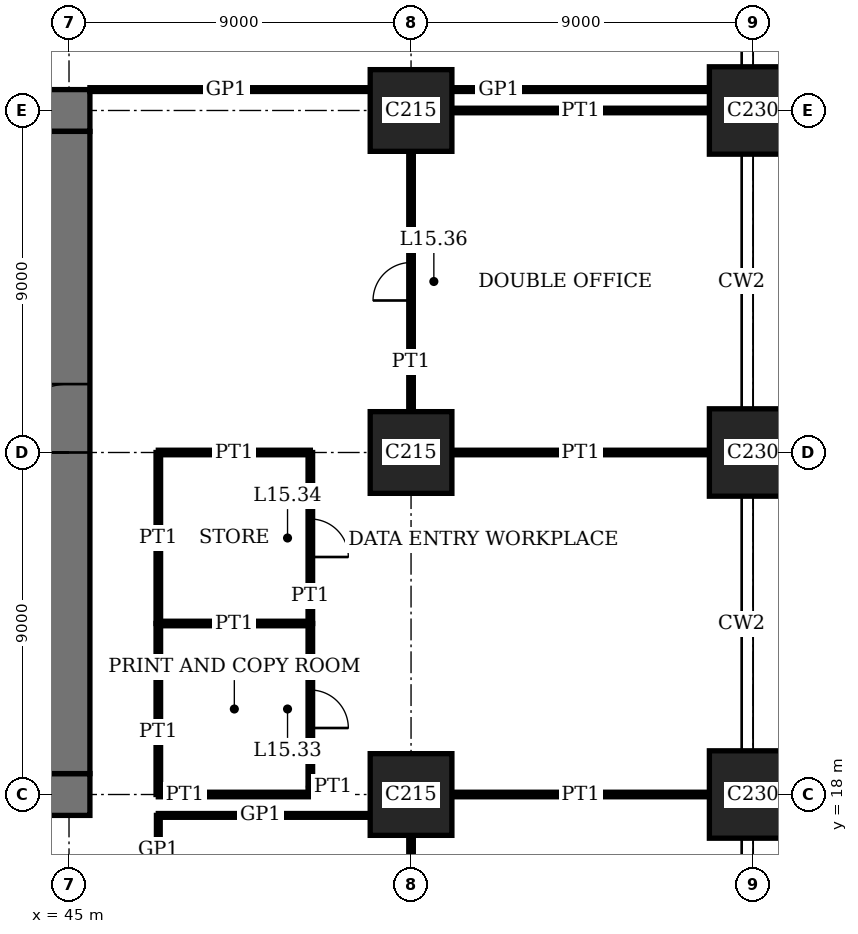
"""IFC4 building model, lengths in metres.
Left out: names, types, materials, properties, quantities, classifications, styles, units other than length and angle.
Written with IfcOpenShell. Run it as: python <this file> out.ifc"""

import sys

from ifc_helpers import new_model, si_unit, direction, frame, frame_2d, origin, origin_2d, place, context, subcontext, project, spatial, rectangle, extrude, element, fill, save


model = new_model("IFC4")
c1 = context("Model", 3, precision=1e-05, world=origin(), true_north=direction((0.0, 1.0)))
c2 = subcontext(c1, "Body", "Model", "MODEL_VIEW")
j1 = project(units=[si_unit("LENGTHUNIT", "METRE"), si_unit("PLANEANGLEUNIT", "RADIAN")], contexts=[c1])
p1 = place(None, origin())
s1 = spatial("IfcSite", under=j1, at=p1, CompositionType="ELEMENT")
p2 = place(p1, origin())
s2 = spatial("IfcBuilding", under=s1, at=p2, CompositionType="ELEMENT")
p3 = place(p2, frame((0.0, 0.0, 63.8)))
s3 = spatial("IfcBuildingStorey", under=s2, at=p3, CompositionType="ELEMENT", Elevation=63.8)
for number, where, z_axis, x_axis in (
    (1, (54.0, 18.0, 0.0), (0.0, 0.0, 1.0), (1.0, 0.0, 0.0)),
    (2, (54.0, 27.0, 0.0), (0.0, 0.0, 1.0), (1.0, 0.0, 0.0)),
    (3, (54.0, 36.0, 0.0), (0.0, 0.0, 1.0), (1.0, 0.0, 0.0)),
):
    element("IfcColumn", number, at=place(p3, frame(where, z_axis=z_axis, x_axis=x_axis)), inside=s3, PredefinedType="COLUMN", context=c2, shape_type="SweptSolid", body=[
        extrude(rectangle(XDim=2.15, YDim=2.15, at=origin_2d()), origin(), (0.0, 0.0, 1.0), 4.0),
    ])
for number, where, z_axis, x_axis in (
    (4, (63.0, 18.0, 0.0), (0.0, 0.0, 1.0), (1.0, 0.0, 0.0)),
    (5, (63.0, 27.0, 0.0), (0.0, 0.0, 1.0), (1.0, 0.0, 0.0)),
    (6, (63.0, 36.0, 0.0), (0.0, 0.0, 1.0), (1.0, 0.0, 0.0)),
):
    element("IfcColumn", number, at=place(p3, frame(where, z_axis=z_axis, x_axis=x_axis)), inside=s3, PredefinedType="COLUMN", context=c2, shape_type="SweptSolid", body=[
        extrude(rectangle(XDim=2.3, YDim=2.3, at=origin_2d()), origin(), (0.0, 0.0, 1.0), 4.0),
    ])
p4 = place(p3, frame((17.45, 18.0, 0.0), z_axis=(0.0, 0.0, 1.0), x_axis=(1.0, 0.0, 0.0)))
e7 = element("IfcWall", 7, at=p4, inside=s3, PredefinedType="SHEAR", context=c2, shape_type="SweptSolid", body=[
    extrude(rectangle(XDim=28.1, YDim=1.1, at=frame_2d((14.05, 0.0))), origin(), (0.0, 0.0, 1.0), 4.0),
])
p5 = place(p4, frame((11.55, 0.0, 0.0)))
e8 = element("IfcOpeningElement", 8, at=p5, cuts=e7, PredefinedType="OPENING", context=c2, shape_type="SweptSolid", body=[
    extrude(rectangle(XDim=1.0, YDim=2.4, at=frame_2d((0.5, 1.2))), frame((0.0, 0.56, 0.0), z_axis=(0.0, -1.0, 0.0), x_axis=(1.0, 0.0, 0.0)), (0.0, 0.0, 1.0), 1.12),
])
p6 = place(p4, frame((16.55, 0.0, 0.0)))
e9 = element("IfcOpeningElement", 9, at=p6, cuts=e7, PredefinedType="OPENING", context=c2, shape_type="SweptSolid", body=[
    extrude(rectangle(XDim=1.0, YDim=2.4, at=frame_2d((0.5, 1.2))), frame((0.0, 0.56, 0.0), z_axis=(0.0, -1.0, 0.0), x_axis=(1.0, 0.0, 0.0)), (0.0, 0.0, 1.0), 1.12),
])
p7 = place(p4, frame((20.0, 0.0, 0.0)))
e10 = element("IfcOpeningElement", 10, at=p7, cuts=e7, PredefinedType="OPENING", context=c2, shape_type="SweptSolid", body=[
    extrude(rectangle(XDim=1.1, YDim=2.4, at=frame_2d((0.55, 1.2))), frame((0.0, 0.56, 0.0), z_axis=(0.0, -1.0, 0.0), x_axis=(1.0, 0.0, 0.0)), (0.0, 0.0, 1.0), 1.12),
])
p8 = place(p4, frame((24.05, 0.0, 0.0)))
e11 = element("IfcOpeningElement", 11, at=p8, cuts=e7, PredefinedType="OPENING", context=c2, shape_type="SweptSolid", body=[
    extrude(rectangle(XDim=1.0, YDim=2.4, at=frame_2d((0.5, 1.2))), frame((0.0, 0.56, 0.0), z_axis=(0.0, -1.0, 0.0), x_axis=(1.0, 0.0, 0.0)), (0.0, 0.0, 1.0), 1.12),
])
p9 = place(p3, frame((45.55, 36.0, 0.0), z_axis=(0.0, 0.0, 1.0), x_axis=(-1.0, 0.0, 0.0)))
e12 = element("IfcWall", 12, at=p9, inside=s3, PredefinedType="SHEAR", context=c2, shape_type="SweptSolid", body=[
    extrude(rectangle(XDim=28.1, YDim=1.1, at=frame_2d((14.05, 0.0))), origin(), (0.0, 0.0, 1.0), 4.0),
])
p10 = place(p9, frame((11.55, 0.0, 0.0)))
e13 = element("IfcOpeningElement", 13, at=p10, cuts=e12, PredefinedType="OPENING", context=c2, shape_type="SweptSolid", body=[
    extrude(rectangle(XDim=1.0, YDim=2.4, at=frame_2d((0.5, 1.2))), frame((0.0, 0.56, 0.0), z_axis=(0.0, -1.0, 0.0), x_axis=(1.0, 0.0, 0.0)), (0.0, 0.0, 1.0), 1.12),
])
p11 = place(p9, frame((16.55, 0.0, 0.0)))
e14 = element("IfcOpeningElement", 14, at=p11, cuts=e12, PredefinedType="OPENING", context=c2, shape_type="SweptSolid", body=[
    extrude(rectangle(XDim=1.0, YDim=2.4, at=frame_2d((0.5, 1.2))), frame((0.0, 0.56, 0.0), z_axis=(0.0, -1.0, 0.0), x_axis=(1.0, 0.0, 0.0)), (0.0, 0.0, 1.0), 1.12),
])
p12 = place(p9, frame((20.0, 0.0, 0.0)))
e15 = element("IfcOpeningElement", 15, at=p12, cuts=e12, PredefinedType="OPENING", context=c2, shape_type="SweptSolid", body=[
    extrude(rectangle(XDim=1.1, YDim=2.4, at=frame_2d((0.55, 1.2))), frame((0.0, 0.56, 0.0), z_axis=(0.0, -1.0, 0.0), x_axis=(1.0, 0.0, 0.0)), (0.0, 0.0, 1.0), 1.12),
])
p13 = place(p9, frame((24.05, 0.0, 0.0)))
e16 = element("IfcOpeningElement", 16, at=p13, cuts=e12, PredefinedType="OPENING", context=c2, shape_type="SweptSolid", body=[
    extrude(rectangle(XDim=1.0, YDim=2.4, at=frame_2d((0.5, 1.2))), frame((0.0, 0.56, 0.0), z_axis=(0.0, -1.0, 0.0), x_axis=(1.0, 0.0, 0.0)), (0.0, 0.0, 1.0), 1.12),
])
p14 = place(p3, frame((45.0, 18.55, 0.0), z_axis=(0.0, 0.0, 1.0), x_axis=(0.0, 1.0, 0.0)))
e17 = element("IfcWall", 17, at=p14, inside=s3, PredefinedType="SHEAR", context=c2, shape_type="SweptSolid", body=[
    extrude(rectangle(XDim=16.9, YDim=1.1, at=frame_2d((8.45, 0.0))), origin(), (0.0, 0.0, 1.0), 4.0),
])
p15 = place(p14, frame((8.45, 0.0, 0.0)))
e18 = element("IfcOpeningElement", 18, at=p15, cuts=e17, PredefinedType="OPENING", context=c2, shape_type="SweptSolid", body=[
    extrude(rectangle(XDim=1.8, YDim=2.4, at=frame_2d((0.9, 1.2))), frame((0.0, 0.56, 0.0), z_axis=(0.0, -1.0, 0.0), x_axis=(1.0, 0.0, 0.0)), (0.0, 0.0, 1.0), 1.12),
])
p16 = place(p3, frame((47.35, 17.45, 0.0), z_axis=(0.0, 0.0, 1.0), x_axis=(1.0, 0.0, 0.0)))
e19 = element("IfcWall", 19, at=p16, inside=s3, PredefinedType="PARTITIONING", context=c2, shape_type="SweptSolid", body=[
    extrude(rectangle(XDim=5.575, YDim=0.1, at=frame_2d((2.788, 0.0))), origin(), (0.0, 0.0, 1.0), 3.05),
])
p17 = place(p3, frame((47.35, 18.0, 0.0), z_axis=(0.0, 0.0, 1.0), x_axis=(1.0, 0.0, 0.0)))
e20 = element("IfcWall", 20, at=p17, inside=s3, PredefinedType="PARTITIONING", context=c2, shape_type="SweptSolid", body=[
    extrude(rectangle(XDim=4.0, YDim=0.12, at=frame_2d((2.0, 0.0))), origin(), (0.0, 0.0, 1.0), 3.05),
])
p18 = place(p3, frame((55.075, 18.0, 0.0), z_axis=(0.0, 0.0, 1.0), x_axis=(1.0, 0.0, 0.0)))
e21 = element("IfcWall", 21, at=p18, inside=s3, PredefinedType="PARTITIONING", context=c2, shape_type="SweptSolid", body=[
    extrude(rectangle(XDim=6.775, YDim=0.12, at=frame_2d((3.388, 0.0))), origin(), (0.0, 0.0, 1.0), 3.05),
])
p19 = place(p3, frame((47.35, 22.5, 0.0), z_axis=(0.0, 0.0, 1.0), x_axis=(1.0, 0.0, 0.0)))
e22 = element("IfcWall", 22, at=p19, inside=s3, PredefinedType="PARTITIONING", context=c2, shape_type="SweptSolid", body=[
    extrude(rectangle(XDim=4.0, YDim=0.12, at=frame_2d((2.0, 0.0))), origin(), (0.0, 0.0, 1.0), 3.1),
])
p20 = place(p3, frame((47.35, 27.0, 0.0), z_axis=(0.0, 0.0, 1.0), x_axis=(1.0, 0.0, 0.0)))
e23 = element("IfcWall", 23, at=p20, inside=s3, PredefinedType="PARTITIONING", context=c2, shape_type="SweptSolid", body=[
    extrude(rectangle(XDim=4.0, YDim=0.12, at=frame_2d((2.0, 0.0))), origin(), (0.0, 0.0, 1.0), 3.05),
])
for number, where, z_axis, x_axis in (
    (24, (55.075, 27.0, 0.0), (0.0, 0.0, 1.0), (1.0, 0.0, 0.0)),
    (25, (55.075, 36.0, 0.0), (0.0, 0.0, 1.0), (1.0, 0.0, 0.0)),
):
    element("IfcWall", number, at=place(p3, frame(where, z_axis=z_axis, x_axis=x_axis)), inside=s3, PredefinedType="PARTITIONING", context=c2, shape_type="SweptSolid", body=[
        extrude(rectangle(XDim=6.775, YDim=0.12, at=frame_2d((3.388, 0.0))), origin(), (0.0, 0.0, 1.0), 3.05),
    ])
p21 = place(p3, frame((45.55, 36.55, 0.0), z_axis=(0.0, 0.0, 1.0), x_axis=(1.0, 0.0, 0.0)))
e26 = element("IfcWall", 26, at=p21, inside=s3, PredefinedType="PARTITIONING", context=c2, shape_type="SweptSolid", body=[
    extrude(rectangle(XDim=7.375, YDim=0.1, at=frame_2d((3.688, 0.0))), origin(), (0.0, 0.0, 1.0), 3.05),
])
p22 = place(p3, frame((55.075, 36.55, 0.0), z_axis=(0.0, 0.0, 1.0), x_axis=(1.0, 0.0, 0.0)))
e27 = element("IfcWall", 27, at=p22, inside=s3, PredefinedType="PARTITIONING", context=c2, shape_type="SweptSolid", body=[
    extrude(rectangle(XDim=6.775, YDim=0.1, at=frame_2d((3.388, 0.0))), origin(), (0.0, 0.0, 1.0), 3.05),
])
for number, where, z_axis, x_axis in (
    (28, (47.35, 18.0, 0.0), (0.0, 0.0, 1.0), (0.0, 1.0, 0.0)),
    (29, (47.35, 22.5, 0.0), (0.0, 0.0, 1.0), (0.0, 1.0, 0.0)),
):
    element("IfcWall", number, at=place(p3, frame(where, z_axis=z_axis, x_axis=x_axis)), inside=s3, PredefinedType="PARTITIONING", context=c2, shape_type="SweptSolid", body=[
        extrude(rectangle(XDim=4.5, YDim=0.12, at=frame_2d((2.25, 0.0))), origin(), (0.0, 0.0, 1.0), 3.75),
    ])
p23 = place(p3, frame((47.35, 15.65, 0.0), z_axis=(0.0, 0.0, 1.0), x_axis=(0.0, 1.0, 0.0)))
e30 = element("IfcWall", 30, at=p23, inside=s3, PredefinedType="PARTITIONING", context=c2, shape_type="SweptSolid", body=[
    extrude(rectangle(XDim=1.8, YDim=0.1, at=frame_2d((0.9, 0.0))), origin(), (0.0, 0.0, 1.0), 3.75),
])
p24 = place(p3, frame((51.35, 18.0, 0.0), z_axis=(0.0, 0.0, 1.0), x_axis=(0.0, 1.0, 0.0)))
e31 = element("IfcWall", 31, at=p24, inside=s3, PredefinedType="PARTITIONING", context=c2, shape_type="SweptSolid", body=[
    extrude(rectangle(XDim=4.5, YDim=0.12, at=frame_2d((2.25, 0.0))), origin(), (0.0, 0.0, 1.0), 3.75),
])
p25 = place(p24, frame((1.75, 0.0, 0.0)))
e32 = element("IfcOpeningElement", 32, at=p25, cuts=e31, PredefinedType="OPENING", context=c2, shape_type="SweptSolid", body=[
    extrude(rectangle(XDim=1.0, YDim=2.4, at=frame_2d((0.5, 1.2))), frame((0.0, 0.07, 0.0), z_axis=(0.0, -1.0, 0.0), x_axis=(1.0, 0.0, 0.0)), (0.0, 0.0, 1.0), 0.14),
])
p26 = place(p3, frame((51.35, 22.5, 0.0), z_axis=(0.0, 0.0, 1.0), x_axis=(0.0, 1.0, 0.0)))
e33 = element("IfcWall", 33, at=p26, inside=s3, PredefinedType="PARTITIONING", context=c2, shape_type="SweptSolid", body=[
    extrude(rectangle(XDim=4.5, YDim=0.12, at=frame_2d((2.25, 0.0))), origin(), (0.0, 0.0, 1.0), 3.75),
])
p27 = place(p26, frame((1.75, 0.0, 0.0)))
e34 = element("IfcOpeningElement", 34, at=p27, cuts=e33, PredefinedType="OPENING", context=c2, shape_type="SweptSolid", body=[
    extrude(rectangle(XDim=1.0, YDim=2.4, at=frame_2d((0.5, 1.2))), frame((0.0, 0.07, 0.0), z_axis=(0.0, -1.0, 0.0), x_axis=(1.0, 0.0, 0.0)), (0.0, 0.0, 1.0), 0.14),
])
p28 = place(p3, frame((54.0, 10.075, 0.0), z_axis=(0.0, 0.0, 1.0), x_axis=(0.0, 1.0, 0.0)))
e35 = element("IfcWall", 35, at=p28, inside=s3, PredefinedType="PARTITIONING", context=c2, shape_type="SweptSolid", body=[
    extrude(rectangle(XDim=6.85, YDim=0.12, at=frame_2d((3.425, 0.0))), origin(), (0.0, 0.0, 1.0), 3.05),
])
p29 = place(p28, frame((2.925, 0.0, 0.0)))
e36 = element("IfcOpeningElement", 36, at=p29, cuts=e35, PredefinedType="OPENING", context=c2, shape_type="SweptSolid", body=[
    extrude(rectangle(XDim=1.0, YDim=2.4, at=frame_2d((0.5, 1.2))), frame((0.0, 0.07, 0.0), z_axis=(0.0, -1.0, 0.0), x_axis=(1.0, 0.0, 0.0)), (0.0, 0.0, 1.0), 0.14),
])
p30 = place(p3, frame((54.0, 28.075, 0.0), z_axis=(0.0, 0.0, 1.0), x_axis=(0.0, 1.0, 0.0)))
e37 = element("IfcWall", 37, at=p30, inside=s3, PredefinedType="PARTITIONING", context=c2, shape_type="SweptSolid", body=[
    extrude(rectangle(XDim=6.85, YDim=0.12, at=frame_2d((3.425, 0.0))), origin(), (0.0, 0.0, 1.0), 3.05),
])
p31 = place(p30, frame((2.925, 0.0, 0.0)))
e38 = element("IfcOpeningElement", 38, at=p31, cuts=e37, PredefinedType="OPENING", context=c2, shape_type="SweptSolid", body=[
    extrude(rectangle(XDim=1.0, YDim=2.4, at=frame_2d((0.5, 1.2))), frame((0.0, 0.07, 0.0), z_axis=(0.0, -1.0, 0.0), x_axis=(1.0, 0.0, 0.0)), (0.0, 0.0, 1.0), 0.14),
])
p32 = place(p15, origin())
e39 = element("IfcDoor", 39, at=p32, inside=s3, OperationType="DOUBLE_DOOR_DOUBLE_SWING", PredefinedType="DOOR", context=c2, shape_type="SweptSolid", body=[
    extrude(rectangle(XDim=1.8, YDim=2.4, at=frame_2d((0.9, 1.2))), frame((0.0, 0.03, 0.0), z_axis=(0.0, -1.0, 0.0), x_axis=(1.0, 0.0, 0.0)), (0.0, 0.0, 1.0), 0.06),
    extrude(rectangle(XDim=0.04, YDim=2.4, at=frame_2d((0.02, 1.2))), frame((0.0, 0.55, 0.0), z_axis=(0.0, -1.0, 0.0), x_axis=(1.0, 0.0, 0.0)), (0.0, 0.0, 1.0), 1.1),
    extrude(rectangle(XDim=0.04, YDim=2.4, at=frame_2d((1.78, 1.2))), frame((0.0, 0.55, 0.0), z_axis=(0.0, -1.0, 0.0), x_axis=(1.0, 0.0, 0.0)), (0.0, 0.0, 1.0), 1.1),
    extrude(rectangle(XDim=1.8, YDim=0.04, at=frame_2d((0.9, 2.38))), frame((0.0, 0.55, 0.0), z_axis=(0.0, -1.0, 0.0), x_axis=(1.0, 0.0, 0.0)), (0.0, 0.0, 1.0), 1.1),
])
fill(e18, e39)
p33 = place(p25, origin())
e40 = element("IfcDoor", 40, at=p33, inside=s3, OperationType="SINGLE_SWING_LEFT", PredefinedType="DOOR", context=c2, shape_type="SweptSolid", body=[
    extrude(rectangle(XDim=1.0, YDim=2.4, at=frame_2d((0.5, 1.2))), frame((0.0, 0.025, 0.0), z_axis=(0.0, -1.0, 0.0), x_axis=(1.0, 0.0, 0.0)), (0.0, 0.0, 1.0), 0.05),
])
fill(e32, e40)
p34 = place(p27, origin())
e41 = element("IfcDoor", 41, at=p34, inside=s3, OperationType="SINGLE_SWING_LEFT", PredefinedType="DOOR", context=c2, shape_type="SweptSolid", body=[
    extrude(rectangle(XDim=1.0, YDim=2.4, at=frame_2d((0.5, 1.2))), frame((0.0, 0.025, 0.0), z_axis=(0.0, -1.0, 0.0), x_axis=(1.0, 0.0, 0.0)), (0.0, 0.0, 1.0), 0.05),
])
fill(e34, e41)
p35 = place(p31, origin())
e42 = element("IfcDoor", 42, at=p35, inside=s3, OperationType="SINGLE_SWING_RIGHT", PredefinedType="DOOR", context=c2, shape_type="SweptSolid", body=[
    extrude(rectangle(XDim=1.0, YDim=2.4, at=frame_2d((0.5, 1.2))), frame((0.0, 0.025, 0.0), z_axis=(0.0, -1.0, 0.0), x_axis=(1.0, 0.0, 0.0)), (0.0, 0.0, 1.0), 0.05),
])
fill(e38, e42)
save(model, sys.argv[1])
